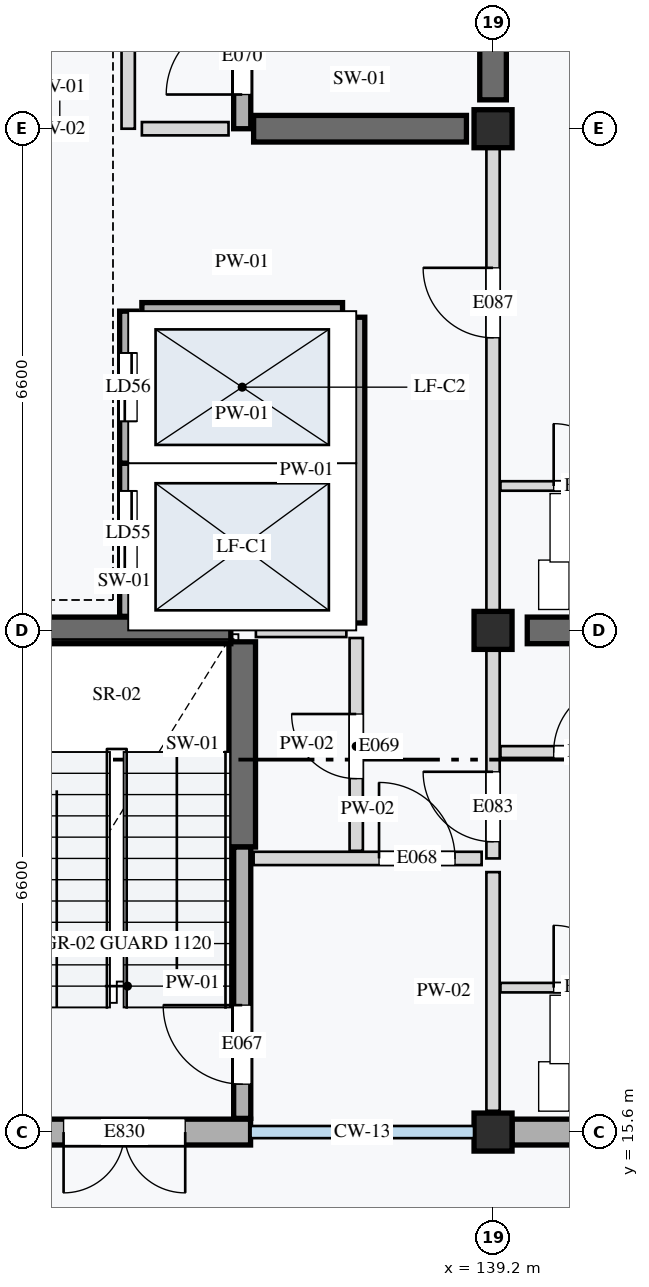
"""IFC4 building model, lengths in metres.
Left out: names, types, materials, properties, quantities, classifications, styles, units other than length and angle.
Written with IfcOpenShell. Run it as: python <this file> out.ifc"""

import sys

from ifc_helpers import new_model, si_unit, direction, frame, frame_2d, origin, origin_2d, place, context, subcontext, project, spatial, rectangle, extrude, element, fill, save


model = new_model("IFC4")
c1 = context("Model", 3, precision=1e-05, world=origin(), true_north=direction((0.0, 1.0)))
c2 = subcontext(c1, "Body", "Model", "MODEL_VIEW")
j1 = project(units=[si_unit("LENGTHUNIT", "METRE"), si_unit("PLANEANGLEUNIT", "RADIAN")], contexts=[c1])
p1 = place(None, origin())
s1 = spatial("IfcSite", under=j1, at=p1, CompositionType="ELEMENT")
p2 = place(p1, origin())
s2 = spatial("IfcBuilding", under=s1, at=p2, CompositionType="ELEMENT")
p3 = place(p2, origin())
s3 = spatial("IfcBuildingStorey", under=s2, at=p3, CompositionType="ELEMENT", Elevation=0.0)
for number, where, z_axis, x_axis in (
    (1, (139.2, 15.6, 0.0), (0.0, 0.0, 1.0), (1.0, 0.0, 0.0)),
    (2, (139.2, 22.2, 0.0), (0.0, 0.0, 1.0), (1.0, 0.0, 0.0)),
    (3, (139.2, 28.8, 0.0), (0.0, 0.0, 1.0), (1.0, 0.0, 0.0)),
):
    element("IfcColumn", number, at=place(p3, frame(where, z_axis=z_axis, x_axis=x_axis)), inside=s3, PredefinedType="COLUMN", context=c2, shape_type="SweptSolid", body=[
        extrude(rectangle(XDim=0.5, YDim=0.5, at=origin_2d()), origin(), (0.0, 0.0, 1.0), 4.2),
    ])
p4 = place(p3, frame((135.9, 19.35, 0.0), z_axis=(0.0, 0.0, 1.0), x_axis=(0.0, 1.0, 0.0)))
e4 = element("IfcWall", 4, at=p4, inside=s3, PredefinedType="SHEAR", context=c2, shape_type="SweptSolid", body=[
    extrude(rectangle(XDim=2.7, YDim=0.35, at=frame_2d((1.35, 0.0))), origin(), (0.0, 0.0, 1.0), 3.92),
])
p5 = place(p3, frame((132.95, 22.2, 0.0), z_axis=(0.0, 0.0, 1.0), x_axis=(1.0, 0.0, 0.0)))
e5 = element("IfcWall", 5, at=p5, inside=s3, PredefinedType="SHEAR", context=c2, shape_type="SweptSolid", body=[
    extrude(rectangle(XDim=2.8, YDim=0.35, at=frame_2d((1.4, 0.0))), origin(), (0.0, 0.0, 1.0), 3.92),
])
p6 = place(p3, frame((139.2, 29.18, 0.0), z_axis=(0.0, 0.0, 1.0), x_axis=(0.0, 1.0, 0.0)))
e6 = element("IfcWall", 6, at=p6, inside=s3, PredefinedType="SHEAR", context=c2, shape_type="SweptSolid", body=[
    extrude(rectangle(XDim=5.84, YDim=0.35, at=frame_2d((2.92, 0.0))), origin(), (0.0, 0.0, 1.0), 3.92),
])
p7 = place(p3, frame((136.05, 28.8, 0.0), z_axis=(0.0, 0.0, 1.0), x_axis=(1.0, 0.0, 0.0)))
e7 = element("IfcWall", 7, at=p7, inside=s3, PredefinedType="SHEAR", context=c2, shape_type="SweptSolid", body=[
    extrude(rectangle(XDim=2.8, YDim=0.35, at=frame_2d((1.4, 0.0))), origin(), (0.0, 0.0, 1.0), 3.92),
])
p8 = place(p3, frame((139.65, 22.2, 0.0), z_axis=(0.0, 0.0, 1.0), x_axis=(1.0, 0.0, 0.0)))
e8 = element("IfcWall", 8, at=p8, inside=s3, PredefinedType="SHEAR", context=c2, shape_type="SweptSolid", body=[
    extrude(rectangle(XDim=5.7, YDim=0.35, at=frame_2d((2.85, 0.0))), origin(), (0.0, 0.0, 1.0), 3.92),
])
p9 = place(p3, frame((139.45, 15.6, 0.0), z_axis=(0.0, 0.0, 1.0), x_axis=(1.0, 0.0, 0.0)))
e9 = element("IfcWall", 9, at=p9, inside=s3, PredefinedType="STANDARD", context=c2, shape_type="SweptSolid", body=[
    extrude(rectangle(XDim=6.1, YDim=0.34, at=frame_2d((3.05, 0.0))), origin(), (0.0, 0.0, 1.0), 3.65),
])
p10 = place(p3, frame((136.01, 15.6, 0.0), z_axis=(0.0, 0.0, 1.0), x_axis=(-1.0, 0.0, 0.0)))
e10 = element("IfcWall", 10, at=p10, inside=s3, PredefinedType="STANDARD", context=c2, shape_type="SweptSolid", body=[
    extrude(rectangle(XDim=3.16, YDim=0.34, at=frame_2d((1.58, 0.0))), origin(), (0.0, 0.0, 1.0), 3.65),
])
p11 = place(p10, frame((0.86, 0.0, 0.0)))
e11 = element("IfcOpeningElement", 11, at=p11, cuts=e10, PredefinedType="OPENING", context=c2, shape_type="SweptSolid", body=[
    extrude(rectangle(XDim=1.6, YDim=2.4, at=frame_2d((0.8, 1.2))), frame((0.0, 0.18, 0.0), z_axis=(0.0, -1.0, 0.0), x_axis=(1.0, 0.0, 0.0)), (0.0, 0.0, 1.0), 0.36),
])
p12 = place(p3, frame((135.9, 15.78, 0.0), z_axis=(0.0, 0.0, 1.0), x_axis=(0.0, 1.0, 0.0)))
e12 = element("IfcWall", 12, at=p12, inside=s3, PredefinedType="STANDARD", context=c2, shape_type="SweptSolid", body=[
    extrude(rectangle(XDim=3.57, YDim=0.225, at=frame_2d((1.785, 0.0))), origin(), (0.0, 0.0, 1.0), 3.92),
])
p13 = place(p12, frame((0.45, 0.0, 0.0)))
e13 = element("IfcOpeningElement", 13, at=p13, cuts=e12, PredefinedType="OPENING", context=c2, shape_type="SweptSolid", body=[
    extrude(rectangle(XDim=1.04, YDim=2.12, at=frame_2d((0.52, 1.06))), frame((0.0, 0.123, 0.0), z_axis=(0.0, -1.0, 0.0), x_axis=(1.0, 0.0, 0.0)), (0.0, 0.0, 1.0), 0.245),
])
p14 = place(p3, frame((136.05, 19.2, 0.0), z_axis=(0.0, 0.0, 1.0), x_axis=(1.0, 0.0, 0.0)))
e14 = element("IfcWall", 14, at=p14, inside=s3, PredefinedType="PARTITIONING", context=c2, shape_type="SweptSolid", body=[
    extrude(rectangle(XDim=3.0, YDim=0.175, at=frame_2d((1.5, 0.0))), origin(), (0.0, 0.0, 1.0), 3.92),
])
p15 = place(p14, frame((1.65, 0.0, 0.0)))
e15 = element("IfcOpeningElement", 15, at=p15, cuts=e14, PredefinedType="OPENING", context=c2, shape_type="SweptSolid", body=[
    extrude(rectangle(XDim=1.0, YDim=2.1, at=frame_2d((0.5, 1.05))), frame((0.0, 0.097, 0.0), z_axis=(0.0, -1.0, 0.0), x_axis=(1.0, 0.0, 0.0)), (0.0, 0.0, 1.0), 0.195),
])
p16 = place(p3, frame((137.4, 19.3, 0.0), z_axis=(0.0, 0.0, 1.0), x_axis=(0.0, 1.0, 0.0)))
e16 = element("IfcWall", 16, at=p16, inside=s3, PredefinedType="PARTITIONING", context=c2, shape_type="SweptSolid", body=[
    extrude(rectangle(XDim=2.8, YDim=0.175, at=frame_2d((1.4, 0.0))), origin(), (0.0, 0.0, 1.0), 3.92),
])
p17 = place(p16, frame((0.95, 0.0, 0.0)))
e17 = element("IfcOpeningElement", 17, at=p17, cuts=e16, PredefinedType="OPENING", context=c2, shape_type="SweptSolid", body=[
    extrude(rectangle(XDim=0.85, YDim=2.0, at=frame_2d((0.425, 1.0))), frame((0.0, 0.097, 0.0), z_axis=(0.0, -1.0, 0.0), x_axis=(1.0, 0.0, 0.0)), (0.0, 0.0, 1.0), 0.195),
])
p18 = place(p3, frame((136.08, 22.2, 0.0), z_axis=(0.0, 0.0, 1.0), x_axis=(1.0, 0.0, 0.0)))
e18 = element("IfcWall", 18, at=p18, inside=s3, PredefinedType="PARTITIONING", context=c2, shape_type="SweptSolid", body=[
    extrude(rectangle(XDim=1.19, YDim=0.175, at=frame_2d((0.595, 0.0))), origin(), (0.0, 0.0, 1.0), 3.92),
])
p19 = place(p3, frame((134.4, 22.385, 0.0), z_axis=(0.0, 0.0, 1.0), x_axis=(0.0, 1.0, 0.0)))
e19 = element("IfcWall", 19, at=p19, inside=s3, PredefinedType="STANDARD", context=c2, shape_type="SweptSolid", body=[
    extrude(rectangle(XDim=2.015, YDim=0.225, at=frame_2d((1.007, 0.0))), origin(), (0.0, 0.0, 1.0), 3.92),
])
p20 = place(p19, frame((0.55, 0.0, 0.0)))
e20 = element("IfcOpeningElement", 20, at=p20, cuts=e19, PredefinedType="OPENING", context=c2, shape_type="SweptSolid", body=[
    extrude(rectangle(XDim=1.1, YDim=2.1, at=frame_2d((0.55, 1.05))), frame((0.0, 0.123, 0.0), z_axis=(0.0, -1.0, 0.0), x_axis=(1.0, 0.0, 0.0)), (0.0, 0.0, 1.0), 0.245),
])
p21 = place(p3, frame((134.4, 24.4, 0.0), z_axis=(0.0, 0.0, 1.0), x_axis=(0.0, 1.0, 0.0)))
e21 = element("IfcWall", 21, at=p21, inside=s3, PredefinedType="STANDARD", context=c2, shape_type="SweptSolid", body=[
    extrude(rectangle(XDim=2.0, YDim=0.225, at=frame_2d((1.0, 0.0))), origin(), (0.0, 0.0, 1.0), 3.92),
])
p22 = place(p21, frame((0.55, 0.0, 0.0)))
e22 = element("IfcOpeningElement", 22, at=p22, cuts=e21, PredefinedType="OPENING", context=c2, shape_type="SweptSolid", body=[
    extrude(rectangle(XDim=0.9, YDim=2.1, at=frame_2d((0.45, 1.05))), frame((0.0, 0.123, 0.0), z_axis=(0.0, -1.0, 0.0), x_axis=(1.0, 0.0, 0.0)), (0.0, 0.0, 1.0), 0.245),
])
p23 = place(p3, frame((137.4, 22.298, 0.0), z_axis=(0.0, 0.0, 1.0), x_axis=(0.0, 1.0, 0.0)))
e23 = element("IfcWall", 23, at=p23, inside=s3, PredefinedType="STANDARD", context=c2, shape_type="SweptSolid", body=[
    extrude(rectangle(XDim=4.022, YDim=0.225, at=frame_2d((2.011, 0.0))), origin(), (0.0, 0.0, 1.0), 3.92),
])
for number, where, z_axis, x_axis in (
    (24, (134.58, 24.4, 0.0), (0.0, 0.0, 1.0), (1.0, 0.0, 0.0)),
    (25, (134.58, 26.4, 0.0), (0.0, 0.0, 1.0), (1.0, 0.0, 0.0)),
):
    element("IfcWall", number, at=place(p3, frame(where, z_axis=z_axis, x_axis=x_axis)), inside=s3, PredefinedType="STANDARD", context=c2, shape_type="SweptSolid", body=[
        extrude(rectangle(XDim=2.64, YDim=0.225, at=frame_2d((1.32, 0.0))), origin(), (0.0, 0.0, 1.0), 3.92),
    ])
p24 = place(p3, frame((135.9, 28.8, 0.0), z_axis=(0.0, 0.0, 1.0), x_axis=(0.0, 1.0, 0.0)))
e26 = element("IfcWall", 26, at=p24, inside=s3, PredefinedType="STANDARD", context=c2, shape_type="SweptSolid", body=[
    extrude(rectangle(XDim=3.45, YDim=0.225, at=frame_2d((1.725, 0.0))), origin(), (0.0, 0.0, 1.0), 3.92),
])
p25 = place(p24, frame((0.45, 0.0, 0.0)))
e27 = element("IfcOpeningElement", 27, at=p25, cuts=e26, PredefinedType="OPENING", context=c2, shape_type="SweptSolid", body=[
    extrude(rectangle(XDim=1.0, YDim=2.16, at=frame_2d((0.5, 1.08))), frame((0.0, 0.123, 0.0), z_axis=(0.0, -1.0, 0.0), x_axis=(1.0, 0.0, 0.0)), (0.0, 0.0, 1.0), 0.245),
])
p26 = place(p3, frame((134.4, 28.8, 0.0), z_axis=(0.0, 0.0, 1.0), x_axis=(0.0, 1.0, 0.0)))
e28 = element("IfcWall", 28, at=p26, inside=s3, PredefinedType="PARTITIONING", context=c2, shape_type="SweptSolid", body=[
    extrude(rectangle(XDim=3.3, YDim=0.175, at=frame_2d((1.65, 0.0))), origin(), (0.0, 0.0, 1.0), 3.92),
])
p27 = place(p26, frame((1.8, 0.0, 0.0)))
e29 = element("IfcOpeningElement", 29, at=p27, cuts=e28, PredefinedType="OPENING", context=c2, shape_type="SweptSolid", body=[
    extrude(rectangle(XDim=1.04, YDim=2.12, at=frame_2d((0.52, 1.06))), frame((0.0, 0.097, 0.0), z_axis=(0.0, -1.0, 0.0), x_axis=(1.0, 0.0, 0.0)), (0.0, 0.0, 1.0), 0.195),
])
p28 = place(p3, frame((134.58, 28.8, 0.0), z_axis=(0.0, 0.0, 1.0), x_axis=(1.0, 0.0, 0.0)))
e30 = element("IfcWall", 30, at=p28, inside=s3, PredefinedType="PARTITIONING", context=c2, shape_type="SweptSolid", body=[
    extrude(rectangle(XDim=1.14, YDim=0.175, at=frame_2d((0.57, 0.0))), origin(), (0.0, 0.0, 1.0), 3.75),
])
p29 = place(p3, frame((139.2, 15.88, 0.0), z_axis=(0.0, 0.0, 1.0), x_axis=(0.0, 1.0, 0.0)))
e31 = element("IfcWall", 31, at=p29, inside=s3, PredefinedType="PARTITIONING", context=c2, shape_type="SweptSolid", body=[
    extrude(rectangle(XDim=3.14, YDim=0.175, at=frame_2d((1.57, 0.0))), origin(), (0.0, 0.0, 1.0), 3.55),
])
p30 = place(p3, frame((139.2, 19.2, 0.0), z_axis=(0.0, 0.0, 1.0), x_axis=(0.0, 1.0, 0.0)))
e32 = element("IfcWall", 32, at=p30, inside=s3, PredefinedType="PARTITIONING", context=c2, shape_type="SweptSolid", body=[
    extrude(rectangle(XDim=3.0, YDim=0.175, at=frame_2d((1.5, 0.0))), origin(), (0.0, 0.0, 1.0), 3.55),
])
p31 = place(p30, frame((0.22, 0.0, 0.0)))
e33 = element("IfcOpeningElement", 33, at=p31, cuts=e32, PredefinedType="OPENING", context=c2, shape_type="SweptSolid", body=[
    extrude(rectangle(XDim=0.92, YDim=2.14, at=frame_2d((0.46, 1.07))), frame((0.0, 0.097, 0.0), z_axis=(0.0, -1.0, 0.0), x_axis=(1.0, 0.0, 0.0)), (0.0, 0.0, 1.0), 0.195),
])
p32 = place(p3, frame((139.298, 17.5, 0.0), z_axis=(0.0, 0.0, 1.0), x_axis=(1.0, 0.0, 0.0)))
e34 = element("IfcWall", 34, at=p32, inside=s3, PredefinedType="PARTITIONING", context=c2, shape_type="SweptSolid", body=[
    extrude(rectangle(XDim=2.302, YDim=0.125, at=frame_2d((1.151, 0.0))), origin(), (0.0, 0.0, 1.0), 3.92),
])
p33 = place(p32, frame((0.7, 0.0, 0.0)))
e35 = element("IfcOpeningElement", 35, at=p33, cuts=e34, PredefinedType="OPENING", context=c2, shape_type="SweptSolid", body=[
    extrude(rectangle(XDim=0.82, YDim=2.05, at=frame_2d((0.41, 1.025))), frame((0.0, 0.073, 0.0), z_axis=(0.0, -1.0, 0.0), x_axis=(1.0, 0.0, 0.0)), (0.0, 0.0, 1.0), 0.145),
])
p34 = place(p3, frame((139.298, 20.6, 0.0), z_axis=(0.0, 0.0, 1.0), x_axis=(1.0, 0.0, 0.0)))
e36 = element("IfcWall", 36, at=p34, inside=s3, PredefinedType="PARTITIONING", context=c2, shape_type="SweptSolid", body=[
    extrude(rectangle(XDim=2.302, YDim=0.155, at=frame_2d((1.151, 0.0))), origin(), (0.0, 0.0, 1.0), 3.92),
])
p35 = place(p34, frame((0.7, 0.0, 0.0)))
e37 = element("IfcOpeningElement", 37, at=p35, cuts=e36, PredefinedType="OPENING", context=c2, shape_type="SweptSolid", body=[
    extrude(rectangle(XDim=0.9, YDim=2.16, at=frame_2d((0.45, 1.08))), frame((0.0, 0.087, 0.0), z_axis=(0.0, -1.0, 0.0), x_axis=(1.0, 0.0, 0.0)), (0.0, 0.0, 1.0), 0.175),
])
p36 = place(p3, frame((139.2, 22.2, 0.0), z_axis=(0.0, 0.0, 1.0), x_axis=(0.0, 1.0, 0.0)))
e38 = element("IfcWall", 38, at=p36, inside=s3, PredefinedType="PARTITIONING", context=c2, shape_type="SweptSolid", body=[
    extrude(rectangle(XDim=6.6, YDim=0.175, at=frame_2d((3.3, 0.0))), origin(), (0.0, 0.0, 1.0), 3.55),
])
p37 = place(p36, frame((3.85, 0.0, 0.0)))
e39 = element("IfcOpeningElement", 39, at=p37, cuts=e38, PredefinedType="OPENING", context=c2, shape_type="SweptSolid", body=[
    extrude(rectangle(XDim=0.92, YDim=2.14, at=frame_2d((0.46, 1.07))), frame((0.0, 0.097, 0.0), z_axis=(0.0, -1.0, 0.0), x_axis=(1.0, 0.0, 0.0)), (0.0, 0.0, 1.0), 0.195),
])
p38 = place(p3, frame((139.298, 24.1, 0.0), z_axis=(0.0, 0.0, 1.0), x_axis=(1.0, 0.0, 0.0)))
e40 = element("IfcWall", 40, at=p38, inside=s3, PredefinedType="PARTITIONING", context=c2, shape_type="SweptSolid", body=[
    extrude(rectangle(XDim=2.302, YDim=0.125, at=frame_2d((1.151, 0.0))), origin(), (0.0, 0.0, 1.0), 3.92),
])
p39 = place(p38, frame((0.7, 0.0, 0.0)))
e41 = element("IfcOpeningElement", 41, at=p39, cuts=e40, PredefinedType="OPENING", context=c2, shape_type="SweptSolid", body=[
    extrude(rectangle(XDim=0.82, YDim=2.05, at=frame_2d((0.41, 1.025))), frame((0.0, 0.073, 0.0), z_axis=(0.0, -1.0, 0.0), x_axis=(1.0, 0.0, 0.0)), (0.0, 0.0, 1.0), 0.145),
])
p40 = place(p11, origin())
e42 = element("IfcDoor", 42, at=p40, inside=s3, OperationType="DOUBLE_DOOR_SINGLE_SWING", PredefinedType="DOOR", context=c2, shape_type="SweptSolid", body=[
    extrude(rectangle(XDim=1.6, YDim=2.4, at=frame_2d((0.8, 1.2))), frame((0.0, 0.025, 0.0), z_axis=(0.0, -1.0, 0.0), x_axis=(1.0, 0.0, 0.0)), (0.0, 0.0, 1.0), 0.05),
])
fill(e11, e42)
p41 = place(p13, origin())
e43 = element("IfcDoor", 43, at=p41, inside=s3, OperationType="SINGLE_SWING_RIGHT", PredefinedType="DOOR", context=c2, shape_type="SweptSolid", body=[
    extrude(rectangle(XDim=1.04, YDim=2.12, at=frame_2d((0.52, 1.06))), frame((0.0, 0.025, 0.0), z_axis=(0.0, -1.0, 0.0), x_axis=(1.0, 0.0, 0.0)), (0.0, 0.0, 1.0), 0.05),
])
fill(e13, e43)
p42 = place(p15, origin())
e44 = element("IfcDoor", 44, at=p42, inside=s3, OperationType="SINGLE_SWING_LEFT", PredefinedType="DOOR", context=c2, shape_type="SweptSolid", body=[
    extrude(rectangle(XDim=1.0, YDim=2.1, at=frame_2d((0.5, 1.05))), frame((0.0, 0.025, 0.0), z_axis=(0.0, -1.0, 0.0), x_axis=(1.0, 0.0, 0.0)), (0.0, 0.0, 1.0), 0.05),
])
fill(e15, e44)
p43 = place(p17, origin())
e45 = element("IfcDoor", 45, at=p43, inside=s3, OperationType="SINGLE_SWING_RIGHT", PredefinedType="DOOR", context=c2, shape_type="SweptSolid", body=[
    extrude(rectangle(XDim=0.85, YDim=2.0, at=frame_2d((0.425, 1.0))), frame((0.0, 0.025, 0.0), z_axis=(0.0, -1.0, 0.0), x_axis=(1.0, 0.0, 0.0)), (0.0, 0.0, 1.0), 0.05),
])
fill(e17, e45)
p44 = place(p20, origin())
e46 = element("IfcDoor", 46, at=p44, inside=s3, OperationType="DOUBLE_DOOR_SLIDING", PredefinedType="DOOR", context=c2, shape_type="SweptSolid", body=[
    extrude(rectangle(XDim=1.1, YDim=2.1, at=frame_2d((0.55, 1.05))), frame((0.0, 0.025, 0.0), z_axis=(0.0, -1.0, 0.0), x_axis=(1.0, 0.0, 0.0)), (0.0, 0.0, 1.0), 0.05),
])
fill(e20, e46)
p45 = place(p22, origin())
e47 = element("IfcDoor", 47, at=p45, inside=s3, OperationType="DOUBLE_DOOR_SLIDING", PredefinedType="DOOR", context=c2, shape_type="SweptSolid", body=[
    extrude(rectangle(XDim=0.9, YDim=2.1, at=frame_2d((0.45, 1.05))), frame((0.0, 0.025, 0.0), z_axis=(0.0, -1.0, 0.0), x_axis=(1.0, 0.0, 0.0)), (0.0, 0.0, 1.0), 0.05),
])
fill(e22, e47)
p46 = place(p25, origin())
e48 = element("IfcDoor", 48, at=p46, inside=s3, OperationType="SINGLE_SWING_LEFT", PredefinedType="DOOR", context=c2, shape_type="SweptSolid", body=[
    extrude(rectangle(XDim=1.0, YDim=2.16, at=frame_2d((0.5, 1.08))), frame((0.0, 0.025, 0.0), z_axis=(0.0, -1.0, 0.0), x_axis=(1.0, 0.0, 0.0)), (0.0, 0.0, 1.0), 0.05),
])
fill(e27, e48)
p47 = place(p31, origin())
e49 = element("IfcDoor", 49, at=p47, inside=s3, OperationType="SINGLE_SWING_RIGHT", PredefinedType="DOOR", context=c2, shape_type="SweptSolid", body=[
    extrude(rectangle(XDim=0.92, YDim=2.14, at=frame_2d((0.46, 1.07))), frame((0.0, 0.025, 0.0), z_axis=(0.0, -1.0, 0.0), x_axis=(1.0, 0.0, 0.0)), (0.0, 0.0, 1.0), 0.05),
])
fill(e33, e49)
p48 = place(p33, origin())
e50 = element("IfcDoor", 50, at=p48, inside=s3, OperationType="SINGLE_SWING_LEFT", PredefinedType="DOOR", context=c2, shape_type="SweptSolid", body=[
    extrude(rectangle(XDim=0.82, YDim=2.05, at=frame_2d((0.41, 1.025))), frame((0.0, 0.025, 0.0), z_axis=(0.0, -1.0, 0.0), x_axis=(1.0, 0.0, 0.0)), (0.0, 0.0, 1.0), 0.05),
])
fill(e35, e50)
p49 = place(p35, origin())
e51 = element("IfcDoor", 51, at=p49, inside=s3, OperationType="SINGLE_SWING_RIGHT", PredefinedType="DOOR", context=c2, shape_type="SweptSolid", body=[
    extrude(rectangle(XDim=0.9, YDim=2.16, at=frame_2d((0.45, 1.08))), frame((0.0, 0.025, 0.0), z_axis=(0.0, -1.0, 0.0), x_axis=(1.0, 0.0, 0.0)), (0.0, 0.0, 1.0), 0.05),
])
fill(e37, e51)
p50 = place(p37, origin())
e52 = element("IfcDoor", 52, at=p50, inside=s3, OperationType="SINGLE_SWING_RIGHT", PredefinedType="DOOR", context=c2, shape_type="SweptSolid", body=[
    extrude(rectangle(XDim=0.92, YDim=2.14, at=frame_2d((0.46, 1.07))), frame((0.0, 0.025, 0.0), z_axis=(0.0, -1.0, 0.0), x_axis=(1.0, 0.0, 0.0)), (0.0, 0.0, 1.0), 0.05),
])
fill(e39, e52)
p51 = place(p39, origin())
e53 = element("IfcDoor", 53, at=p51, inside=s3, OperationType="SINGLE_SWING_LEFT", PredefinedType="DOOR", context=c2, shape_type="SweptSolid", body=[
    extrude(rectangle(XDim=0.82, YDim=2.05, at=frame_2d((0.41, 1.025))), frame((0.0, 0.025, 0.0), z_axis=(0.0, -1.0, 0.0), x_axis=(1.0, 0.0, 0.0)), (0.0, 0.0, 1.0), 0.05),
])
fill(e41, e53)
save(model, sys.argv[1])
